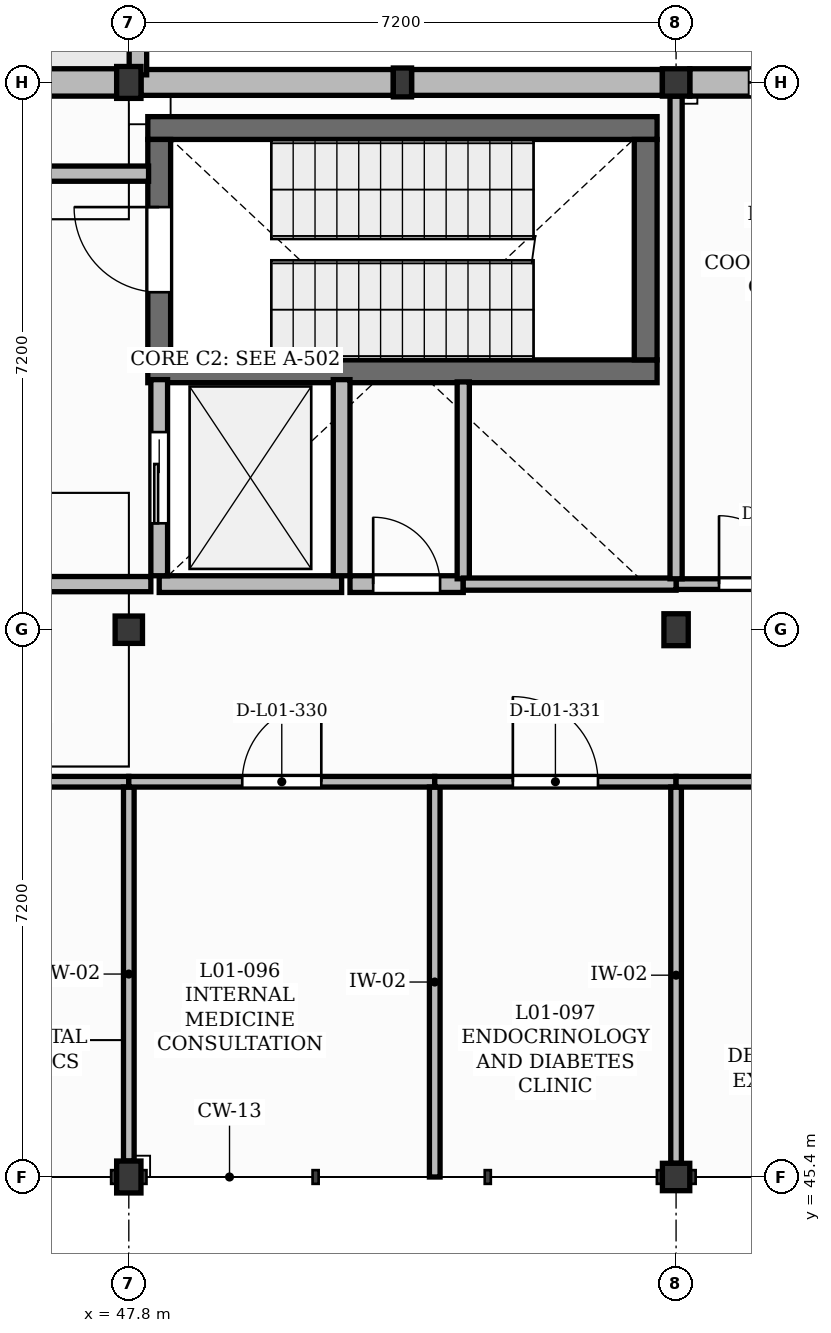
"""IFC4 building model, lengths in metres.
Left out: names, types, materials, properties, quantities, classifications, styles, units other than length and angle.
Written with IfcOpenShell. Run it as: python <this file> out.ifc"""

import sys

from ifc_helpers import new_model, si_unit, direction, frame, frame_2d, origin, origin_2d, place, context, subcontext, project, spatial, rectangle, extrude, element, fill, save


model = new_model("IFC4")
c1 = context("Model", 3, precision=1e-05, world=origin(), true_north=direction((0.0, 1.0)))
c2 = subcontext(c1, "Body", "Model", "MODEL_VIEW")
j1 = project(units=[si_unit("LENGTHUNIT", "METRE"), si_unit("PLANEANGLEUNIT", "RADIAN")], contexts=[c1])
p1 = place(None, origin())
s1 = spatial("IfcSite", under=j1, at=p1, CompositionType="ELEMENT")
p2 = place(p1, origin())
s2 = spatial("IfcBuilding", under=s1, at=p2, CompositionType="ELEMENT")
p3 = place(p2, frame((0.0, 0.0, 4.5)))
s3 = spatial("IfcBuildingStorey", under=s2, at=p3, CompositionType="ELEMENT", Elevation=4.5)
p4 = place(p3, frame((47.8, 45.4, 0.0), z_axis=(0.0, 0.0, 1.0), x_axis=(1.0, 0.0, 0.0)))
e1 = element("IfcColumn", 1, at=p4, inside=s3, PredefinedType="COLUMN", context=c2, shape_type="SweptSolid", body=[
    extrude(rectangle(XDim=0.32, YDim=0.42, at=origin_2d()), origin(), (0.0, 0.0, 1.0), 4.26),
])
p5 = place(p3, frame((47.8, 52.6, 0.0), z_axis=(0.0, 0.0, 1.0), x_axis=(1.0, 0.0, 0.0)))
e2 = element("IfcColumn", 2, at=p5, inside=s3, PredefinedType="COLUMN", context=c2, shape_type="SweptSolid", body=[
    extrude(rectangle(XDim=0.36, YDim=0.36, at=origin_2d()), origin(), (0.0, 0.0, 1.0), 4.26),
])
p6 = place(p3, frame((47.8, 59.8, 0.0), z_axis=(0.0, 0.0, 1.0), x_axis=(1.0, 0.0, 0.0)))
e3 = element("IfcColumn", 3, at=p6, inside=s3, PredefinedType="COLUMN", context=c2, shape_type="SweptSolid", body=[
    extrude(rectangle(XDim=0.32, YDim=0.42, at=origin_2d()), origin(), (0.0, 0.0, 1.0), 4.26),
])
p7 = place(p3, frame((55.0, 45.4, 0.0), z_axis=(0.0, 0.0, 1.0), x_axis=(1.0, 0.0, 0.0)))
e4 = element("IfcColumn", 4, at=p7, inside=s3, PredefinedType="COLUMN", context=c2, shape_type="SweptSolid", body=[
    extrude(rectangle(XDim=0.36, YDim=0.36, at=origin_2d()), origin(), (0.0, 0.0, 1.0), 4.26),
])
p8 = place(p3, frame((55.0, 52.6, 0.0), z_axis=(0.0, 0.0, 1.0), x_axis=(1.0, 0.0, 0.0)))
e5 = element("IfcColumn", 5, at=p8, inside=s3, PredefinedType="COLUMN", context=c2, shape_type="SweptSolid", body=[
    extrude(rectangle(XDim=0.32, YDim=0.42, at=origin_2d()), origin(), (0.0, 0.0, 1.0), 4.26),
])
p9 = place(p3, frame((55.0, 59.8, 0.0), z_axis=(0.0, 0.0, 1.0), x_axis=(1.0, 0.0, 0.0)))
e6 = element("IfcColumn", 6, at=p9, inside=s3, PredefinedType="COLUMN", context=c2, shape_type="SweptSolid", body=[
    extrude(rectangle(XDim=0.36, YDim=0.36, at=origin_2d()), origin(), (0.0, 0.0, 1.0), 4.26),
])
p10 = place(p3, frame((51.4, 59.8, 0.0), z_axis=(0.0, 0.0, 1.0), x_axis=(1.0, 0.0, 0.0)))
e7 = element("IfcColumn", 7, at=p10, inside=s3, PredefinedType="PILASTER", context=c2, shape_type="SweptSolid", body=[
    extrude(rectangle(XDim=0.24, YDim=0.38, at=origin_2d()), origin(), (0.0, 0.0, 1.0), 4.26),
])
p11 = place(p3, frame((40.78, 59.8, 0.0), z_axis=(0.0, 0.0, 1.0), x_axis=(1.0, 0.0, 0.0)))
e8 = element("IfcWall", 8, at=p11, inside=s3, PredefinedType="SOLIDWALL", context=c2, shape_type="SweptSolid", body=[
    extrude(rectangle(XDim=6.86, YDim=0.36, at=frame_2d((3.43, 0.0))), origin(), (0.0, 0.0, 1.0), 3.8),
])
p12 = place(p11, frame((0.66, 0.0, 1.05)))
e9 = element("IfcOpeningElement", 9, at=p12, cuts=e8, PredefinedType="OPENING", context=c2, shape_type="SweptSolid", body=[
    extrude(rectangle(XDim=1.82, YDim=1.65, at=frame_2d((0.91, 0.825))), frame((0.0, 0.19, 0.0), z_axis=(0.0, -1.0, 0.0), x_axis=(1.0, 0.0, 0.0)), (0.0, 0.0, 1.0), 0.38),
])
p13 = place(p11, frame((4.33, 0.0, 1.0)))
e10 = element("IfcOpeningElement", 10, at=p13, cuts=e8, PredefinedType="OPENING", context=c2, shape_type="SweptSolid", body=[
    extrude(rectangle(XDim=1.1, YDim=1.8, at=frame_2d((0.55, 0.9))), frame((0.0, 0.19, 0.0), z_axis=(0.0, -1.0, 0.0), x_axis=(1.0, 0.0, 0.0)), (0.0, 0.0, 1.0), 0.38),
])
p14 = place(p3, frame((47.96, 59.8, 0.0), z_axis=(0.0, 0.0, 1.0), x_axis=(1.0, 0.0, 0.0)))
e11 = element("IfcWall", 11, at=p14, inside=s3, PredefinedType="SOLIDWALL", context=c2, shape_type="SweptSolid", body=[
    extrude(rectangle(XDim=3.32, YDim=0.34, at=frame_2d((1.66, 0.0))), origin(), (0.0, 0.0, 1.0), 3.8),
])
p15 = place(p3, frame((51.52, 59.8, 0.0), z_axis=(0.0, 0.0, 1.0), x_axis=(1.0, 0.0, 0.0)))
e12 = element("IfcWall", 12, at=p15, inside=s3, PredefinedType="SOLIDWALL", context=c2, shape_type="SweptSolid", body=[
    extrude(rectangle(XDim=3.3, YDim=0.34, at=frame_2d((1.65, 0.0))), origin(), (0.0, 0.0, 1.0), 3.8),
])
p16 = place(p3, frame((55.18, 59.8, 0.0), z_axis=(0.0, 0.0, 1.0), x_axis=(1.0, 0.0, 0.0)))
e13 = element("IfcWall", 13, at=p16, inside=s3, PredefinedType="SOLIDWALL", context=c2, shape_type="SweptSolid", body=[
    extrude(rectangle(XDim=3.3, YDim=0.36, at=frame_2d((1.65, 0.0))), origin(), (0.0, 0.0, 1.0), 3.8),
])
p17 = place(p16, frame((0.775, 0.0, 1.5)))
e14 = element("IfcOpeningElement", 14, at=p17, cuts=e13, PredefinedType="OPENING", context=c2, shape_type="SweptSolid", body=[
    extrude(rectangle(XDim=1.32, YDim=1.25, at=frame_2d((0.66, 0.625))), frame((0.0, 0.19, 0.0), z_axis=(0.0, -1.0, 0.0), x_axis=(1.0, 0.0, 0.0)), (0.0, 0.0, 1.0), 0.38),
])
p18 = place(p3, frame((47.92, 59.9, -0.05), z_axis=(0.0, 0.0, 1.0), x_axis=(0.0, 1.0, 0.0)))
e15 = element("IfcWall", 15, at=p18, inside=s3, PredefinedType="PARAPET", context=c2, shape_type="SweptSolid", body=[
    extrude(rectangle(XDim=1.68, YDim=0.23, at=frame_2d((0.84, 0.0))), origin(), (0.0, 0.0, 1.0), 0.8),
])
for number, where, z_axis, x_axis in (
    (16, (48.05, 56.0, 0.0), (0.0, 0.0, 1.0), (1.0, 0.0, 0.0)),
    (17, (48.05, 59.2, 0.0), (0.0, 0.0, 1.0), (1.0, 0.0, 0.0)),
):
    element("IfcWall", number, at=place(p3, frame(where, z_axis=z_axis, x_axis=x_axis)), inside=s3, PredefinedType="SHEAR", context=c2, shape_type="SweptSolid", body=[
        extrude(rectangle(XDim=6.7, YDim=0.3, at=frame_2d((3.35, 0.0))), origin(), (0.0, 0.0, 1.0), 4.25),
    ])
p19 = place(p3, frame((48.2, 56.15, 0.0), z_axis=(0.0, 0.0, 1.0), x_axis=(0.0, 1.0, 0.0)))
e18 = element("IfcWall", 18, at=p19, inside=s3, PredefinedType="SHEAR", context=c2, shape_type="SweptSolid", body=[
    extrude(rectangle(XDim=2.9, YDim=0.3, at=frame_2d((1.45, 0.0))), origin(), (0.0, 0.0, 1.0), 4.25),
])
p20 = place(p19, frame((0.89, 0.0, 0.0)))
e19 = element("IfcOpeningElement", 19, at=p20, cuts=e18, PredefinedType="OPENING", context=c2, shape_type="SweptSolid", body=[
    extrude(rectangle(XDim=1.12, YDim=2.1, at=frame_2d((0.56, 1.05))), frame((0.0, 0.16, 0.0), z_axis=(0.0, -1.0, 0.0), x_axis=(1.0, 0.0, 0.0)), (0.0, 0.0, 1.0), 0.32),
])
p21 = place(p3, frame((54.6, 56.15, 0.0), z_axis=(0.0, 0.0, 1.0), x_axis=(0.0, 1.0, 0.0)))
e20 = element("IfcWall", 20, at=p21, inside=s3, PredefinedType="SHEAR", context=c2, shape_type="SweptSolid", body=[
    extrude(rectangle(XDim=2.9, YDim=0.3, at=frame_2d((1.45, 0.0))), origin(), (0.0, 0.0, 1.0), 4.25),
])
p22 = place(p3, frame((48.2, 53.2, 0.0), z_axis=(0.0, 0.0, 1.0), x_axis=(1.0, 0.0, 0.0)))
e21 = element("IfcWall", 21, at=p22, inside=s3, PredefinedType="SOLIDWALL", context=c2, shape_type="SweptSolid", body=[
    extrude(rectangle(XDim=2.4, YDim=0.22, at=frame_2d((1.2, 0.0))), origin(), (0.0, 0.0, 1.0), 4.25),
])
p23 = place(p3, frame((48.2, 53.31, 0.0), z_axis=(0.0, 0.0, 1.0), x_axis=(0.0, 1.0, 0.0)))
e22 = element("IfcWall", 22, at=p23, inside=s3, PredefinedType="SOLIDWALL", context=c2, shape_type="SweptSolid", body=[
    extrude(rectangle(XDim=2.58, YDim=0.22, at=frame_2d((1.29, 0.0))), origin(), (0.0, 0.0, 1.0), 4.25),
])
p24 = place(p23, frame((0.69, 0.0, 0.0)))
e23 = element("IfcOpeningElement", 23, at=p24, cuts=e22, PredefinedType="OPENING", context=c2, shape_type="SweptSolid", body=[
    extrude(rectangle(XDim=1.2, YDim=2.15, at=frame_2d((0.6, 1.075))), frame((0.0, 0.12, 0.0), z_axis=(0.0, -1.0, 0.0), x_axis=(1.0, 0.0, 0.0)), (0.0, 0.0, 1.0), 0.24),
])
p25 = place(p3, frame((50.6, 53.31, 0.0), z_axis=(0.0, 0.0, 1.0), x_axis=(0.0, 1.0, 0.0)))
e24 = element("IfcWall", 24, at=p25, inside=s3, PredefinedType="SOLIDWALL", context=c2, shape_type="SweptSolid", body=[
    extrude(rectangle(XDim=2.58, YDim=0.22, at=frame_2d((1.29, 0.0))), origin(), (0.0, 0.0, 1.0), 4.25),
])
p26 = place(p3, frame((43.8, 53.2, 0.0), z_axis=(0.0, 0.0, 1.0), x_axis=(1.0, 0.0, 0.0)))
e25 = element("IfcWall", 25, at=p26, inside=s3, PredefinedType="PARTITIONING", context=c2, shape_type="SweptSolid", body=[
    extrude(rectangle(XDim=4.29, YDim=0.2, at=frame_2d((2.145, 0.0))), origin(), (0.0, 0.0, 1.0), 4.18),
])
p27 = place(p26, frame((1.405, 0.0, 0.0)))
e26 = element("IfcOpeningElement", 26, at=p27, cuts=e25, PredefinedType="OPENING", context=c2, shape_type="SweptSolid", body=[
    extrude(rectangle(XDim=1.48, YDim=2.25, at=frame_2d((0.74, 1.125))), frame((0.0, 0.11, 0.0), z_axis=(0.0, -1.0, 0.0), x_axis=(1.0, 0.0, 0.0)), (0.0, 0.0, 1.0), 0.22),
])
p28 = place(p3, frame((44.567, 50.6, 0.0), z_axis=(0.0, 0.0, 1.0), x_axis=(1.0, 0.0, 0.0)))
e27 = element("IfcWall", 27, at=p28, inside=s3, PredefinedType="PARTITIONING", context=c2, shape_type="SweptSolid", body=[
    extrude(rectangle(XDim=3.233, YDim=0.14, at=frame_2d((1.617, 0.0))), origin(), (0.0, 0.0, 1.0), 4.18),
])
p29 = place(p28, frame((1.037, 0.0, 0.0)))
e28 = element("IfcOpeningElement", 28, at=p29, cuts=e27, PredefinedType="OPENING", context=c2, shape_type="SweptSolid", body=[
    extrude(rectangle(XDim=1.16, YDim=2.1, at=frame_2d((0.58, 1.05))), frame((0.0, 0.08, 0.0), z_axis=(0.0, -1.0, 0.0), x_axis=(1.0, 0.0, 0.0)), (0.0, 0.0, 1.0), 0.16),
])
p30 = place(p3, frame((47.8, 45.61, 0.0), z_axis=(0.0, 0.0, 1.0), x_axis=(0.0, 1.0, 0.0)))
e29 = element("IfcWall", 29, at=p30, inside=s3, PredefinedType="PARTITIONING", context=c2, shape_type="SweptSolid", body=[
    extrude(rectangle(XDim=4.92, YDim=0.14, at=frame_2d((2.46, 0.0))), origin(), (0.0, 0.0, 1.0), 3.74),
])
p31 = place(p3, frame((47.8, 50.6, 0.0), z_axis=(0.0, 0.0, 1.0), x_axis=(1.0, 0.0, 0.0)))
e30 = element("IfcWall", 30, at=p31, inside=s3, PredefinedType="PARTITIONING", context=c2, shape_type="SweptSolid", body=[
    extrude(rectangle(XDim=4.025, YDim=0.14, at=frame_2d((2.012, 0.0))), origin(), (0.0, 0.0, 1.0), 4.18),
])
p32 = place(p31, frame((1.492, 0.0, 0.0)))
e31 = element("IfcOpeningElement", 31, at=p32, cuts=e30, PredefinedType="OPENING", context=c2, shape_type="SweptSolid", body=[
    extrude(rectangle(XDim=1.04, YDim=2.1, at=frame_2d((0.52, 1.05))), frame((0.0, 0.08, 0.0), z_axis=(0.0, -1.0, 0.0), x_axis=(1.0, 0.0, 0.0)), (0.0, 0.0, 1.0), 0.16),
])
p33 = place(p3, frame((50.71, 53.2, 0.0), z_axis=(0.0, 0.0, 1.0), x_axis=(1.0, 0.0, 0.0)))
e32 = element("IfcWall", 32, at=p33, inside=s3, PredefinedType="SOLIDWALL", context=c2, shape_type="SweptSolid", body=[
    extrude(rectangle(XDim=1.49, YDim=0.22, at=frame_2d((0.745, 0.0))), origin(), (0.0, 0.0, 1.0), 4.18),
])
p34 = place(p33, frame((0.305, 0.0, 0.0)))
e33 = element("IfcOpeningElement", 33, at=p34, cuts=e32, PredefinedType="OPENING", context=c2, shape_type="SweptSolid", body=[
    extrude(rectangle(XDim=0.88, YDim=2.05, at=frame_2d((0.44, 1.025))), frame((0.0, 0.12, 0.0), z_axis=(0.0, -1.0, 0.0), x_axis=(1.0, 0.0, 0.0)), (0.0, 0.0, 1.0), 0.24),
])
p35 = place(p3, frame((51.825, 45.4, 0.0), z_axis=(0.0, 0.0, 1.0), x_axis=(0.0, 1.0, 0.0)))
e34 = element("IfcWall", 34, at=p35, inside=s3, PredefinedType="PARTITIONING", context=c2, shape_type="SweptSolid", body=[
    extrude(rectangle(XDim=5.13, YDim=0.14, at=frame_2d((2.565, 0.0))), origin(), (0.0, 0.0, 1.0), 4.18),
])
p36 = place(p3, frame((51.825, 50.6, 0.0), z_axis=(0.0, 0.0, 1.0), x_axis=(1.0, 0.0, 0.0)))
e35 = element("IfcWall", 35, at=p36, inside=s3, PredefinedType="PARTITIONING", context=c2, shape_type="SweptSolid", body=[
    extrude(rectangle(XDim=3.175, YDim=0.14, at=frame_2d((1.587, 0.0))), origin(), (0.0, 0.0, 1.0), 4.18),
])
p37 = place(p36, frame((1.028, 0.0, 0.0)))
e36 = element("IfcOpeningElement", 36, at=p37, cuts=e35, PredefinedType="OPENING", context=c2, shape_type="SweptSolid", body=[
    extrude(rectangle(XDim=1.12, YDim=2.15, at=frame_2d((0.56, 1.075))), frame((0.0, 0.08, 0.0), z_axis=(0.0, -1.0, 0.0), x_axis=(1.0, 0.0, 0.0)), (0.0, 0.0, 1.0), 0.16),
])
p38 = place(p3, frame((55.0, 45.58, 0.0), z_axis=(0.0, 0.0, 1.0), x_axis=(0.0, 1.0, 0.0)))
e37 = element("IfcWall", 37, at=p38, inside=s3, PredefinedType="PARTITIONING", context=c2, shape_type="SweptSolid", body=[
    extrude(rectangle(XDim=4.95, YDim=0.14, at=frame_2d((2.475, 0.0))), origin(), (0.0, 0.0, 1.0), 3.74),
])
p39 = place(p3, frame((55.0, 50.6, 0.0), z_axis=(0.0, 0.0, 1.0), x_axis=(1.0, 0.0, 0.0)))
e38 = element("IfcWall", 38, at=p39, inside=s3, PredefinedType="PARTITIONING", context=c2, shape_type="SweptSolid", body=[
    extrude(rectangle(XDim=3.478, YDim=0.14, at=frame_2d((1.739, 0.0))), origin(), (0.0, 0.0, 1.0), 4.18),
])
p40 = place(p39, frame((1.279, 0.0, 0.0)))
e39 = element("IfcOpeningElement", 39, at=p40, cuts=e38, PredefinedType="OPENING", context=c2, shape_type="SweptSolid", body=[
    extrude(rectangle(XDim=0.92, YDim=2.1, at=frame_2d((0.46, 1.05))), frame((0.0, 0.08, 0.0), z_axis=(0.0, -1.0, 0.0), x_axis=(1.0, 0.0, 0.0)), (0.0, 0.0, 1.0), 0.16),
])
p41 = place(p3, frame((55.0, 53.2, 0.0), z_axis=(0.0, 0.0, 1.0), x_axis=(1.0, 0.0, 0.0)))
e40 = element("IfcWall", 40, at=p41, inside=s3, PredefinedType="PARTITIONING", context=c2, shape_type="SweptSolid", body=[
    extrude(rectangle(XDim=2.93, YDim=0.14, at=frame_2d((1.465, 0.0))), origin(), (0.0, 0.0, 1.0), 4.18),
])
p42 = place(p41, frame((0.565, 0.0, 0.0)))
e41 = element("IfcOpeningElement", 41, at=p42, cuts=e40, PredefinedType="OPENING", context=c2, shape_type="SweptSolid", body=[
    extrude(rectangle(XDim=1.8, YDim=2.3, at=frame_2d((0.9, 1.15))), frame((0.0, 0.08, 0.0), z_axis=(0.0, -1.0, 0.0), x_axis=(1.0, 0.0, 0.0)), (0.0, 0.0, 1.0), 0.16),
])
p43 = place(p3, frame((52.2, 53.27, 0.0), z_axis=(0.0, 0.0, 1.0), x_axis=(0.0, 1.0, 0.0)))
e42 = element("IfcWall", 42, at=p43, inside=s3, PredefinedType="PARTITIONING", context=c2, shape_type="SweptSolid", body=[
    extrude(rectangle(XDim=2.59, YDim=0.16, at=frame_2d((1.295, 0.0))), origin(), (0.0, 0.0, 1.0), 4.18),
])
p44 = place(p3, frame((48.06, 58.6, 0.0), z_axis=(0.0, 0.0, 1.0), x_axis=(-1.0, 0.0, 0.0)))
e43 = element("IfcWall", 43, at=p44, inside=s3, PredefinedType="PARTITIONING", context=c2, shape_type="SweptSolid", body=[
    extrude(rectangle(XDim=4.26, YDim=0.2, at=frame_2d((2.13, 0.0))), origin(), (0.0, 0.0, 1.0), 4.18),
])
p45 = place(p3, frame((55.0, 53.2, 0.0), z_axis=(0.0, 0.0, 1.0), x_axis=(-1.0, 0.0, 0.0)))
e44 = element("IfcWall", 44, at=p45, inside=s3, PredefinedType="PARTITIONING", context=c2, shape_type="SweptSolid", body=[
    extrude(rectangle(XDim=2.8, YDim=0.16, at=frame_2d((1.4, 0.0))), origin(), (0.0, 0.0, 1.0), 4.18),
])
p46 = place(p3, frame((55.0, 53.27, 0.0), z_axis=(0.0, 0.0, 1.0), x_axis=(0.0, 1.0, 0.0)))
e45 = element("IfcWall", 45, at=p46, inside=s3, PredefinedType="PARTITIONING", context=c2, shape_type="SweptSolid", body=[
    extrude(rectangle(XDim=6.35, YDim=0.16, at=frame_2d((3.175, 0.0))), origin(), (0.0, 0.0, 1.0), 3.74),
])
p47 = place(p17, origin())
e46 = element("IfcWindow", 46, at=p47, inside=s3, PartitioningType="SINGLE_PANEL", PredefinedType="WINDOW", context=c2, shape_type="SweptSolid", body=[
    extrude(rectangle(XDim=1.32, YDim=1.25, at=frame_2d((0.66, 0.625))), frame((0.0, 0.03, 0.0), z_axis=(0.0, -1.0, 0.0), x_axis=(1.0, 0.0, 0.0)), (0.0, 0.0, 1.0), 0.06),
])
fill(e14, e46)
p48 = place(p24, origin())
e47 = element("IfcDoor", 47, at=p48, inside=s3, OperationType="SLIDING_TO_LEFT", PredefinedType="DOOR", context=c2, shape_type="SweptSolid", body=[
    extrude(rectangle(XDim=1.2, YDim=2.15, at=frame_2d((0.6, 1.075))), frame((0.0, 0.025, 0.0), z_axis=(0.0, -1.0, 0.0), x_axis=(1.0, 0.0, 0.0)), (0.0, 0.0, 1.0), 0.05),
])
fill(e23, e47)
p49 = place(p20, origin())
e48 = element("IfcDoor", 48, at=p49, inside=s3, OperationType="SINGLE_SWING_RIGHT", PredefinedType="DOOR", context=c2, shape_type="SweptSolid", body=[
    extrude(rectangle(XDim=1.12, YDim=2.1, at=frame_2d((0.56, 1.05))), frame((0.0, 0.025, 0.0), z_axis=(0.0, -1.0, 0.0), x_axis=(1.0, 0.0, 0.0)), (0.0, 0.0, 1.0), 0.05),
])
fill(e19, e48)
p50 = place(p34, origin())
e49 = element("IfcDoor", 49, at=p50, inside=s3, OperationType="SINGLE_SWING_LEFT", PredefinedType="DOOR", context=c2, shape_type="SweptSolid", body=[
    extrude(rectangle(XDim=0.88, YDim=2.05, at=frame_2d((0.44, 1.025))), frame((0.0, 0.025, 0.0), z_axis=(0.0, -1.0, 0.0), x_axis=(1.0, 0.0, 0.0)), (0.0, 0.0, 1.0), 0.05),
])
fill(e33, e49)
p51 = place(p32, origin())
e50 = element("IfcDoor", 50, at=p51, inside=s3, OperationType="SINGLE_SWING_RIGHT", PredefinedType="DOOR", context=c2, shape_type="SweptSolid", body=[
    extrude(rectangle(XDim=1.04, YDim=2.1, at=frame_2d((0.52, 1.05))), frame((0.0, 0.025, 0.0), z_axis=(0.0, -1.0, 0.0), x_axis=(1.0, 0.0, 0.0)), (0.0, 0.0, 1.0), 0.05),
])
fill(e31, e50)
p52 = place(p37, origin())
e51 = element("IfcDoor", 51, at=p52, inside=s3, OperationType="SINGLE_SWING_LEFT", PredefinedType="DOOR", context=c2, shape_type="SweptSolid", body=[
    extrude(rectangle(XDim=1.12, YDim=2.15, at=frame_2d((0.56, 1.075))), frame((0.0, 0.025, 0.0), z_axis=(0.0, -1.0, 0.0), x_axis=(1.0, 0.0, 0.0)), (0.0, 0.0, 1.0), 0.05),
])
fill(e36, e51)
p53 = place(p42, origin())
e52 = element("IfcDoor", 52, at=p53, inside=s3, OperationType="DOUBLE_DOOR_SINGLE_SWING", PredefinedType="DOOR", context=c2, shape_type="SweptSolid", body=[
    extrude(rectangle(XDim=1.8, YDim=2.3, at=frame_2d((0.9, 1.15))), frame((0.0, 0.025, 0.0), z_axis=(0.0, -1.0, 0.0), x_axis=(1.0, 0.0, 0.0)), (0.0, 0.0, 1.0), 0.05),
])
fill(e41, e52)
save(model, sys.argv[1])
